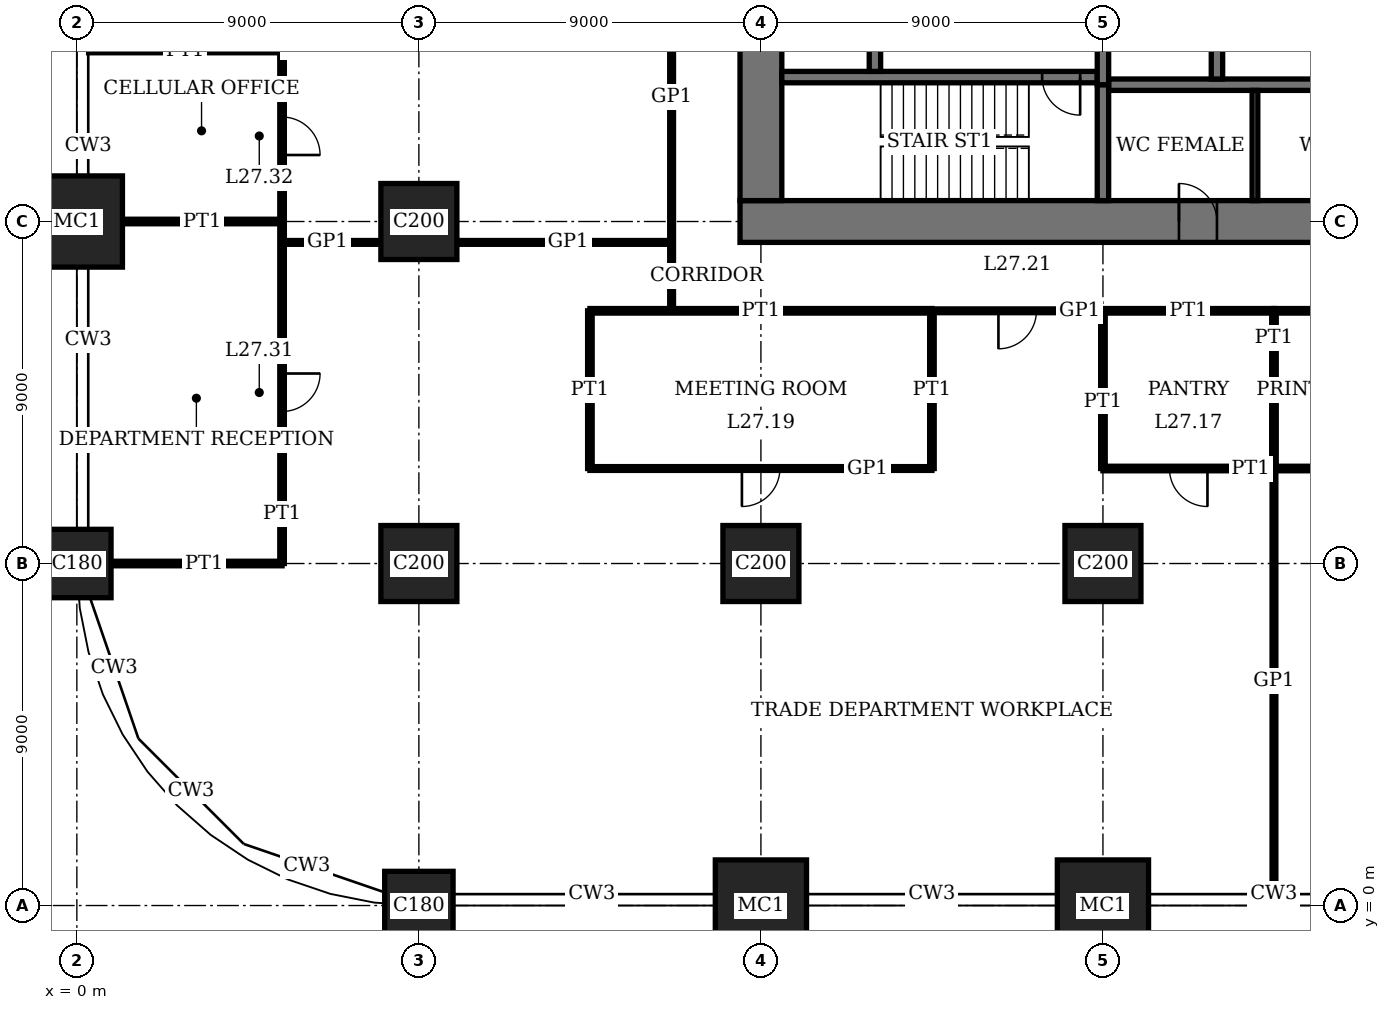
"""IFC4 building model, lengths in metres.
Left out: names, types, materials, properties, quantities, classifications, styles, units other than length and angle.
Written with IfcOpenShell. Run it as: python <this file> out.ifc"""

import sys

from ifc_helpers import new_model, si_unit, direction, frame, frame_2d, origin, origin_2d, place, context, subcontext, project, spatial, rectangle, extrude, element, fill, save


model = new_model("IFC4")
c1 = context("Model", 3, precision=1e-05, world=origin(), true_north=direction((0.0, 1.0)))
c2 = subcontext(c1, "Body", "Model", "MODEL_VIEW")
j1 = project(units=[si_unit("LENGTHUNIT", "METRE"), si_unit("PLANEANGLEUNIT", "RADIAN")], contexts=[c1])
p1 = place(None, origin())
s1 = spatial("IfcSite", under=j1, at=p1, CompositionType="ELEMENT")
p2 = place(p1, origin())
s2 = spatial("IfcBuilding", under=s1, at=p2, CompositionType="ELEMENT")
p3 = place(p2, frame((0.0, 0.0, 113.0)))
s3 = spatial("IfcBuildingStorey", under=s2, at=p3, CompositionType="ELEMENT", Elevation=113.0)
p4 = place(p3, frame((0.0, 9.0, 0.0), z_axis=(0.0, 0.0, 1.0), x_axis=(1.0, 0.0, 0.0)))
e1 = element("IfcColumn", 1, at=p4, inside=s3, PredefinedType="COLUMN", context=c2, shape_type="SweptSolid", body=[
    extrude(rectangle(XDim=1.8, YDim=1.8, at=origin_2d()), origin(), (0.0, 0.0, 1.0), 4.0),
])
p5 = place(p3, frame((0.0, 18.0, 0.0), z_axis=(0.0, 0.0, 1.0), x_axis=(1.0, 0.0, 0.0)))
e2 = element("IfcColumn", 2, at=p5, inside=s3, PredefinedType="COLUMN", context=c2, shape_type="SweptSolid", body=[
    extrude(rectangle(XDim=2.4, YDim=2.4, at=origin_2d()), origin(), (0.0, 0.0, 1.0), 4.0),
])
p6 = place(p3, frame((9.0, 0.0, 0.0), z_axis=(0.0, 0.0, 1.0), x_axis=(1.0, 0.0, 0.0)))
e3 = element("IfcColumn", 3, at=p6, inside=s3, PredefinedType="COLUMN", context=c2, shape_type="SweptSolid", body=[
    extrude(rectangle(XDim=1.8, YDim=1.8, at=origin_2d()), origin(), (0.0, 0.0, 1.0), 4.0),
])
for number, where, z_axis, x_axis in (
    (4, (9.0, 9.0, 0.0), (0.0, 0.0, 1.0), (1.0, 0.0, 0.0)),
    (5, (9.0, 18.0, 0.0), (0.0, 0.0, 1.0), (1.0, 0.0, 0.0)),
):
    element("IfcColumn", number, at=place(p3, frame(where, z_axis=z_axis, x_axis=x_axis)), inside=s3, PredefinedType="COLUMN", context=c2, shape_type="SweptSolid", body=[
        extrude(rectangle(XDim=2.0, YDim=2.0, at=origin_2d()), origin(), (0.0, 0.0, 1.0), 4.0),
    ])
p7 = place(p3, frame((18.0, 0.0, 0.0), z_axis=(0.0, 0.0, 1.0), x_axis=(1.0, 0.0, 0.0)))
e6 = element("IfcColumn", 6, at=p7, inside=s3, PredefinedType="COLUMN", context=c2, shape_type="SweptSolid", body=[
    extrude(rectangle(XDim=2.4, YDim=2.4, at=origin_2d()), origin(), (0.0, 0.0, 1.0), 4.0),
])
p8 = place(p3, frame((18.0, 9.0, 0.0), z_axis=(0.0, 0.0, 1.0), x_axis=(1.0, 0.0, 0.0)))
e7 = element("IfcColumn", 7, at=p8, inside=s3, PredefinedType="COLUMN", context=c2, shape_type="SweptSolid", body=[
    extrude(rectangle(XDim=2.0, YDim=2.0, at=origin_2d()), origin(), (0.0, 0.0, 1.0), 4.0),
])
p9 = place(p3, frame((27.0, 0.0, 0.0), z_axis=(0.0, 0.0, 1.0), x_axis=(1.0, 0.0, 0.0)))
e8 = element("IfcColumn", 8, at=p9, inside=s3, PredefinedType="COLUMN", context=c2, shape_type="SweptSolid", body=[
    extrude(rectangle(XDim=2.4, YDim=2.4, at=origin_2d()), origin(), (0.0, 0.0, 1.0), 4.0),
])
p10 = place(p3, frame((27.0, 9.0, 0.0), z_axis=(0.0, 0.0, 1.0), x_axis=(1.0, 0.0, 0.0)))
e9 = element("IfcColumn", 9, at=p10, inside=s3, PredefinedType="COLUMN", context=c2, shape_type="SweptSolid", body=[
    extrude(rectangle(XDim=2.0, YDim=2.0, at=origin_2d()), origin(), (0.0, 0.0, 1.0), 4.0),
])
p11 = place(p3, frame((17.45, 18.0, 0.0), z_axis=(0.0, 0.0, 1.0), x_axis=(1.0, 0.0, 0.0)))
e10 = element("IfcWall", 10, at=p11, inside=s3, PredefinedType="SHEAR", context=c2, shape_type="SweptSolid", body=[
    extrude(rectangle(XDim=28.1, YDim=1.1, at=frame_2d((14.05, 0.0))), origin(), (0.0, 0.0, 1.0), 4.0),
])
p12 = place(p11, frame((11.55, 0.0, 0.0)))
e11 = element("IfcOpeningElement", 11, at=p12, cuts=e10, PredefinedType="OPENING", context=c2, shape_type="SweptSolid", body=[
    extrude(rectangle(XDim=1.0, YDim=2.4, at=frame_2d((0.5, 1.2))), frame((0.0, 0.56, 0.0), z_axis=(0.0, -1.0, 0.0), x_axis=(1.0, 0.0, 0.0)), (0.0, 0.0, 1.0), 1.12),
])
p13 = place(p11, frame((16.55, 0.0, 0.0)))
e12 = element("IfcOpeningElement", 12, at=p13, cuts=e10, PredefinedType="OPENING", context=c2, shape_type="SweptSolid", body=[
    extrude(rectangle(XDim=1.0, YDim=2.4, at=frame_2d((0.5, 1.2))), frame((0.0, 0.56, 0.0), z_axis=(0.0, -1.0, 0.0), x_axis=(1.0, 0.0, 0.0)), (0.0, 0.0, 1.0), 1.12),
])
p14 = place(p11, frame((20.0, 0.0, 0.0)))
e13 = element("IfcOpeningElement", 13, at=p14, cuts=e10, PredefinedType="OPENING", context=c2, shape_type="SweptSolid", body=[
    extrude(rectangle(XDim=1.1, YDim=2.4, at=frame_2d((0.55, 1.2))), frame((0.0, 0.56, 0.0), z_axis=(0.0, -1.0, 0.0), x_axis=(1.0, 0.0, 0.0)), (0.0, 0.0, 1.0), 1.12),
])
p15 = place(p11, frame((24.05, 0.0, 0.0)))
e14 = element("IfcOpeningElement", 14, at=p15, cuts=e10, PredefinedType="OPENING", context=c2, shape_type="SweptSolid", body=[
    extrude(rectangle(XDim=1.0, YDim=2.4, at=frame_2d((0.5, 1.2))), frame((0.0, 0.56, 0.0), z_axis=(0.0, -1.0, 0.0), x_axis=(1.0, 0.0, 0.0)), (0.0, 0.0, 1.0), 1.12),
])
p16 = place(p3, frame((18.0, 35.45, 0.0), z_axis=(0.0, 0.0, 1.0), x_axis=(0.0, -1.0, 0.0)))
e15 = element("IfcWall", 15, at=p16, inside=s3, PredefinedType="SHEAR", context=c2, shape_type="SweptSolid", body=[
    extrude(rectangle(XDim=16.9, YDim=1.1, at=frame_2d((8.45, 0.0))), origin(), (0.0, 0.0, 1.0), 4.0),
])
p17 = place(p16, frame((8.45, 0.0, 0.0)))
e16 = element("IfcOpeningElement", 16, at=p17, cuts=e15, PredefinedType="OPENING", context=c2, shape_type="SweptSolid", body=[
    extrude(rectangle(XDim=1.8, YDim=2.4, at=frame_2d((0.9, 1.2))), frame((0.0, 0.56, 0.0), z_axis=(0.0, -1.0, 0.0), x_axis=(1.0, 0.0, 0.0)), (0.0, 0.0, 1.0), 1.12),
])
p18 = place(p3, frame((18.55, 21.8, 0.0), z_axis=(0.0, 0.0, 1.0), x_axis=(1.0, 0.0, 0.0)))
e17 = element("IfcWall", 17, at=p18, inside=s3, PredefinedType="SHEAR", context=c2, shape_type="SweptSolid", body=[
    extrude(rectangle(XDim=8.3, YDim=0.3, at=frame_2d((4.15, 0.0))), origin(), (0.0, 0.0, 1.0), 4.0),
])
p19 = place(p18, frame((6.85, 0.0, 0.0)))
e18 = element("IfcOpeningElement", 18, at=p19, cuts=e17, PredefinedType="OPENING", context=c2, shape_type="SweptSolid", body=[
    extrude(rectangle(XDim=1.0, YDim=2.4, at=frame_2d((0.5, 1.2))), frame((0.0, 0.16, 0.0), z_axis=(0.0, -1.0, 0.0), x_axis=(1.0, 0.0, 0.0)), (0.0, 0.0, 1.0), 0.32),
])
p20 = place(p3, frame((27.0, 18.55, 0.0), z_axis=(0.0, 0.0, 1.0), x_axis=(0.0, 1.0, 0.0)))
e19 = element("IfcWall", 19, at=p20, inside=s3, PredefinedType="SHEAR", context=c2, shape_type="SweptSolid", body=[
    extrude(rectangle(XDim=3.05, YDim=0.3, at=frame_2d((1.525, 0.0))), origin(), (0.0, 0.0, 1.0), 4.0),
])
p21 = place(p3, frame((21.0, 21.95, 0.0), z_axis=(0.0, 0.0, 1.0), x_axis=(0.0, 1.0, 0.0)))
e20 = element("IfcWall", 20, at=p21, inside=s3, PredefinedType="SHEAR", context=c2, shape_type="SweptSolid", body=[
    extrude(rectangle(XDim=2.5, YDim=0.3, at=frame_2d((1.25, 0.0))), origin(), (0.0, 0.0, 1.0), 4.0),
])
p22 = place(p21, frame((0.7, 0.0, 0.0)))
e21 = element("IfcOpeningElement", 21, at=p22, cuts=e20, PredefinedType="OPENING", context=c2, shape_type="SweptSolid", body=[
    extrude(rectangle(XDim=1.1, YDim=2.4, at=frame_2d((0.55, 1.2))), frame((0.0, 0.16, 0.0), z_axis=(0.0, -1.0, 0.0), x_axis=(1.0, 0.0, 0.0)), (0.0, 0.0, 1.0), 0.32),
])
p23 = place(p3, frame((27.15, 21.6, 0.0), z_axis=(0.0, 0.0, 1.0), x_axis=(1.0, 0.0, 0.0)))
e22 = element("IfcWall", 22, at=p23, inside=s3, PredefinedType="SHEAR", context=c2, shape_type="SweptSolid", body=[
    extrude(rectangle(XDim=17.3, YDim=0.3, at=frame_2d((8.65, 0.0))), origin(), (0.0, 0.0, 1.0), 4.0),
])
p24 = place(p3, frame((30.0, 21.75, 0.0), z_axis=(0.0, 0.0, 1.0), x_axis=(0.0, 1.0, 0.0)))
e23 = element("IfcWall", 23, at=p24, inside=s3, PredefinedType="SHEAR", context=c2, shape_type="SweptSolid", body=[
    extrude(rectangle(XDim=2.7, YDim=0.3, at=frame_2d((1.35, 0.0))), origin(), (0.0, 0.0, 1.0), 4.0),
])
p25 = place(p3, frame((27.0, 21.6, 0.0), z_axis=(0.0, 0.0, 1.0), x_axis=(0.0, 1.0, 0.0)))
e24 = element("IfcWall", 24, at=p25, inside=s3, PredefinedType="SHEAR", context=c2, shape_type="SweptSolid", body=[
    extrude(rectangle(XDim=2.85, YDim=0.3, at=frame_2d((1.425, 0.0))), origin(), (0.0, 0.0, 1.0), 4.0),
])
p26 = place(p3, frame((0.9, 9.0, 0.0), z_axis=(0.0, 0.0, 1.0), x_axis=(1.0, 0.0, 0.0)))
e25 = element("IfcWall", 25, at=p26, inside=s3, PredefinedType="PARTITIONING", context=c2, shape_type="SweptSolid", body=[
    extrude(rectangle(XDim=4.5, YDim=0.12, at=frame_2d((2.25, 0.0))), origin(), (0.0, 0.0, 1.0), 3.05),
])
p27 = place(p3, frame((27.0, 11.5, 0.0), z_axis=(0.0, 0.0, 1.0), x_axis=(1.0, 0.0, 0.0)))
e26 = element("IfcWall", 26, at=p27, inside=s3, PredefinedType="PARTITIONING", context=c2, shape_type="SweptSolid", body=[
    extrude(rectangle(XDim=4.5, YDim=0.12, at=frame_2d((2.25, 0.0))), origin(), (0.0, 0.0, 1.0), 3.75),
])
p28 = place(p27, frame((1.75, 0.0, 0.0)))
e27 = element("IfcOpeningElement", 27, at=p28, cuts=e26, PredefinedType="OPENING", context=c2, shape_type="SweptSolid", body=[
    extrude(rectangle(XDim=1.0, YDim=2.4, at=frame_2d((0.5, 1.2))), frame((0.0, 0.07, 0.0), z_axis=(0.0, -1.0, 0.0), x_axis=(1.0, 0.0, 0.0)), (0.0, 0.0, 1.0), 0.14),
])
p29 = place(p3, frame((31.5, 11.5, 0.0), z_axis=(0.0, 0.0, 1.0), x_axis=(1.0, 0.0, 0.0)))
e28 = element("IfcWall", 28, at=p29, inside=s3, PredefinedType="PARTITIONING", context=c2, shape_type="SweptSolid", body=[
    extrude(rectangle(XDim=4.5, YDim=0.12, at=frame_2d((2.25, 0.0))), origin(), (0.0, 0.0, 1.0), 3.75),
])
p30 = place(p29, frame((1.75, 0.0, 0.0)))
e29 = element("IfcOpeningElement", 29, at=p30, cuts=e28, PredefinedType="OPENING", context=c2, shape_type="SweptSolid", body=[
    extrude(rectangle(XDim=1.0, YDim=2.4, at=frame_2d((0.5, 1.2))), frame((0.0, 0.07, 0.0), z_axis=(0.0, -1.0, 0.0), x_axis=(1.0, 0.0, 0.0)), (0.0, 0.0, 1.0), 0.14),
])
p31 = place(p3, frame((13.5, 11.5, 0.0), z_axis=(0.0, 0.0, 1.0), x_axis=(1.0, 0.0, 0.0)))
e30 = element("IfcWall", 30, at=p31, inside=s3, PredefinedType="PARTITIONING", context=c2, shape_type="SweptSolid", body=[
    extrude(rectangle(XDim=9.0, YDim=0.1, at=frame_2d((4.5, 0.0))), origin(), (0.0, 0.0, 1.0), 3.75),
])
p32 = place(p31, frame((4.0, 0.0, 0.0)))
e31 = element("IfcOpeningElement", 31, at=p32, cuts=e30, PredefinedType="OPENING", context=c2, shape_type="SweptSolid", body=[
    extrude(rectangle(XDim=1.0, YDim=2.4, at=frame_2d((0.5, 1.2))), frame((0.0, 0.06, 0.0), z_axis=(0.0, -1.0, 0.0), x_axis=(1.0, 0.0, 0.0)), (0.0, 0.0, 1.0), 0.12),
])
p33 = place(p3, frame((13.5, 15.65, 0.0), z_axis=(0.0, 0.0, 1.0), x_axis=(1.0, 0.0, 0.0)))
e32 = element("IfcWall", 32, at=p33, inside=s3, PredefinedType="PARTITIONING", context=c2, shape_type="SweptSolid", body=[
    extrude(rectangle(XDim=9.0, YDim=0.12, at=frame_2d((4.5, 0.0))), origin(), (0.0, 0.0, 1.0), 3.75),
])
for number, where, z_axis, x_axis in (
    (33, (27.0, 15.65, 0.0), (0.0, 0.0, 1.0), (1.0, 0.0, 0.0)),
    (34, (31.5, 15.65, 0.0), (0.0, 0.0, 1.0), (1.0, 0.0, 0.0)),
):
    element("IfcWall", number, at=place(p3, frame(where, z_axis=z_axis, x_axis=x_axis)), inside=s3, PredefinedType="PARTITIONING", context=c2, shape_type="SweptSolid", body=[
        extrude(rectangle(XDim=4.5, YDim=0.12, at=frame_2d((2.25, 0.0))), origin(), (0.0, 0.0, 1.0), 3.75),
    ])
p34 = place(p3, frame((22.5, 15.65, 0.0), z_axis=(0.0, 0.0, 1.0), x_axis=(1.0, 0.0, 0.0)))
e35 = element("IfcWall", 35, at=p34, inside=s3, PredefinedType="PARTITIONING", context=c2, shape_type="SweptSolid", body=[
    extrude(rectangle(XDim=4.5, YDim=0.1, at=frame_2d((2.25, 0.0))), origin(), (0.0, 0.0, 1.0), 3.75),
])
p35 = place(p34, frame((1.75, 0.0, 0.0)))
e36 = element("IfcOpeningElement", 36, at=p35, cuts=e35, PredefinedType="OPENING", context=c2, shape_type="SweptSolid", body=[
    extrude(rectangle(XDim=1.0, YDim=2.4, at=frame_2d((0.5, 1.2))), frame((0.0, 0.06, 0.0), z_axis=(0.0, -1.0, 0.0), x_axis=(1.0, 0.0, 0.0)), (0.0, 0.0, 1.0), 0.12),
])
p36 = place(p3, frame((5.39, 17.45, 0.0), z_axis=(0.0, 0.0, 1.0), x_axis=(1.0, 0.0, 0.0)))
e37 = element("IfcWall", 37, at=p36, inside=s3, PredefinedType="PARTITIONING", context=c2, shape_type="SweptSolid", body=[
    extrude(rectangle(XDim=2.61, YDim=0.1, at=frame_2d((1.305, 0.0))), origin(), (0.0, 0.0, 1.0), 3.75),
])
p37 = place(p3, frame((10.0, 17.45, 0.0), z_axis=(0.0, 0.0, 1.0), x_axis=(1.0, 0.0, 0.0)))
e38 = element("IfcWall", 38, at=p37, inside=s3, PredefinedType="PARTITIONING", context=c2, shape_type="SweptSolid", body=[
    extrude(rectangle(XDim=5.65, YDim=0.1, at=frame_2d((2.825, 0.0))), origin(), (0.0, 0.0, 1.0), 3.75),
])
p38 = place(p3, frame((1.2, 18.0, 0.0), z_axis=(0.0, 0.0, 1.0), x_axis=(1.0, 0.0, 0.0)))
e39 = element("IfcWall", 39, at=p38, inside=s3, PredefinedType="PARTITIONING", context=c2, shape_type="SweptSolid", body=[
    extrude(rectangle(XDim=4.2, YDim=0.12, at=frame_2d((2.1, 0.0))), origin(), (0.0, 0.0, 1.0), 3.05),
])
p39 = place(p3, frame((0.31, 22.5, 0.0), z_axis=(0.0, 0.0, 1.0), x_axis=(1.0, 0.0, 0.0)))
e40 = element("IfcWall", 40, at=p39, inside=s3, PredefinedType="PARTITIONING", context=c2, shape_type="SweptSolid", body=[
    extrude(rectangle(XDim=5.09, YDim=0.12, at=frame_2d((2.545, 0.0))), origin(), (0.0, 0.0, 1.0), 3.1),
])
p40 = place(p3, frame((5.4, 9.0, 0.0), z_axis=(0.0, 0.0, 1.0), x_axis=(0.0, 1.0, 0.0)))
e41 = element("IfcWall", 41, at=p40, inside=s3, PredefinedType="PARTITIONING", context=c2, shape_type="SweptSolid", body=[
    extrude(rectangle(XDim=9.0, YDim=0.12, at=frame_2d((4.5, 0.0))), origin(), (0.0, 0.0, 1.0), 3.75),
])
p41 = place(p40, frame((4.0, 0.0, 0.0)))
e42 = element("IfcOpeningElement", 42, at=p41, cuts=e41, PredefinedType="OPENING", context=c2, shape_type="SweptSolid", body=[
    extrude(rectangle(XDim=1.0, YDim=2.4, at=frame_2d((0.5, 1.2))), frame((0.0, 0.07, 0.0), z_axis=(0.0, -1.0, 0.0), x_axis=(1.0, 0.0, 0.0)), (0.0, 0.0, 1.0), 0.14),
])
p42 = place(p3, frame((5.4, 18.0, 0.0), z_axis=(0.0, 0.0, 1.0), x_axis=(0.0, 1.0, 0.0)))
e43 = element("IfcWall", 43, at=p42, inside=s3, PredefinedType="PARTITIONING", context=c2, shape_type="SweptSolid", body=[
    extrude(rectangle(XDim=4.5, YDim=0.12, at=frame_2d((2.25, 0.0))), origin(), (0.0, 0.0, 1.0), 3.75),
])
p43 = place(p42, frame((1.75, 0.0, 0.0)))
e44 = element("IfcOpeningElement", 44, at=p43, cuts=e43, PredefinedType="OPENING", context=c2, shape_type="SweptSolid", body=[
    extrude(rectangle(XDim=1.0, YDim=2.4, at=frame_2d((0.5, 1.2))), frame((0.0, 0.07, 0.0), z_axis=(0.0, -1.0, 0.0), x_axis=(1.0, 0.0, 0.0)), (0.0, 0.0, 1.0), 0.14),
])
p44 = place(p3, frame((13.5, 11.5, 0.0), z_axis=(0.0, 0.0, 1.0), x_axis=(0.0, 1.0, 0.0)))
e45 = element("IfcWall", 45, at=p44, inside=s3, PredefinedType="PARTITIONING", context=c2, shape_type="SweptSolid", body=[
    extrude(rectangle(XDim=4.15, YDim=0.12, at=frame_2d((2.075, 0.0))), origin(), (0.0, 0.0, 1.0), 3.75),
])
p45 = place(p3, frame((15.65, 15.65, 0.0), z_axis=(0.0, 0.0, 1.0), x_axis=(0.0, 1.0, 0.0)))
e46 = element("IfcWall", 46, at=p45, inside=s3, PredefinedType="PARTITIONING", context=c2, shape_type="SweptSolid", body=[
    extrude(rectangle(XDim=20.9, YDim=0.1, at=frame_2d((10.45, 0.0))), origin(), (0.0, 0.0, 1.0), 3.75),
])
p46 = place(p45, frame((9.95, 0.0, 0.0)))
e47 = element("IfcOpeningElement", 47, at=p46, cuts=e46, PredefinedType="OPENING", context=c2, shape_type="SweptSolid", body=[
    extrude(rectangle(XDim=1.0, YDim=2.4, at=frame_2d((0.5, 1.2))), frame((0.0, 0.06, 0.0), z_axis=(0.0, -1.0, 0.0), x_axis=(1.0, 0.0, 0.0)), (0.0, 0.0, 1.0), 0.12),
])
p47 = place(p3, frame((22.5, 11.5, 0.0), z_axis=(0.0, 0.0, 1.0), x_axis=(0.0, 1.0, 0.0)))
e48 = element("IfcWall", 48, at=p47, inside=s3, PredefinedType="PARTITIONING", context=c2, shape_type="SweptSolid", body=[
    extrude(rectangle(XDim=4.15, YDim=0.12, at=frame_2d((2.075, 0.0))), origin(), (0.0, 0.0, 1.0), 3.75),
])
p48 = place(p3, frame((27.0, 11.5, 0.0), z_axis=(0.0, 0.0, 1.0), x_axis=(0.0, 1.0, 0.0)))
e49 = element("IfcWall", 49, at=p48, inside=s3, PredefinedType="PARTITIONING", context=c2, shape_type="SweptSolid", body=[
    extrude(rectangle(XDim=4.15, YDim=0.12, at=frame_2d((2.075, 0.0))), origin(), (0.0, 0.0, 1.0), 3.05),
])
p49 = place(p3, frame((31.5, 11.5, 0.0), z_axis=(0.0, 0.0, 1.0), x_axis=(0.0, 1.0, 0.0)))
e50 = element("IfcWall", 50, at=p49, inside=s3, PredefinedType="PARTITIONING", context=c2, shape_type="SweptSolid", body=[
    extrude(rectangle(XDim=4.15, YDim=0.12, at=frame_2d((2.075, 0.0))), origin(), (0.0, 0.0, 1.0), 3.75),
])
p50 = place(p3, frame((31.5, 0.31, 0.0), z_axis=(0.0, 0.0, 1.0), x_axis=(0.0, 1.0, 0.0)))
e51 = element("IfcWall", 51, at=p50, inside=s3, PredefinedType="PARTITIONING", context=c2, shape_type="SweptSolid", body=[
    extrude(rectangle(XDim=11.19, YDim=0.1, at=frame_2d((5.595, 0.0))), origin(), (0.0, 0.0, 1.0), 3.75),
])
p51 = place(p3, frame((31.0, 18.55, 0.0), z_axis=(0.0, 0.0, 1.0), x_axis=(0.0, 1.0, 0.0)))
e52 = element("IfcWall", 52, at=p51, inside=s3, PredefinedType="PARTITIONING", context=c2, shape_type="SweptSolid", body=[
    extrude(rectangle(XDim=2.9, YDim=0.15, at=frame_2d((1.45, 0.0))), origin(), (0.0, 0.0, 1.0), 3.75),
])
p52 = place(p12, origin())
e53 = element("IfcDoor", 53, at=p52, inside=s3, OperationType="SINGLE_SWING_RIGHT", PredefinedType="DOOR", context=c2, shape_type="SweptSolid", body=[
    extrude(rectangle(XDim=1.0, YDim=2.4, at=frame_2d((0.5, 1.2))), frame((0.0, 0.025, 0.0), z_axis=(0.0, -1.0, 0.0), x_axis=(1.0, 0.0, 0.0)), (0.0, 0.0, 1.0), 0.05),
    extrude(rectangle(XDim=0.04, YDim=2.4, at=frame_2d((0.02, 1.2))), frame((0.0, 0.4, 0.0), z_axis=(0.0, -1.0, 0.0), x_axis=(1.0, 0.0, 0.0)), (0.0, 0.0, 1.0), 0.8),
    extrude(rectangle(XDim=0.04, YDim=2.4, at=frame_2d((0.98, 1.2))), frame((0.0, 0.4, 0.0), z_axis=(0.0, -1.0, 0.0), x_axis=(1.0, 0.0, 0.0)), (0.0, 0.0, 1.0), 0.8),
    extrude(rectangle(XDim=1.0, YDim=0.04, at=frame_2d((0.5, 2.38))), frame((0.0, 0.4, 0.0), z_axis=(0.0, -1.0, 0.0), x_axis=(1.0, 0.0, 0.0)), (0.0, 0.0, 1.0), 0.8),
])
fill(e11, e53)
p53 = place(p19, origin())
e54 = element("IfcDoor", 54, at=p53, inside=s3, OperationType="SINGLE_SWING_RIGHT", PredefinedType="DOOR", context=c2, shape_type="SweptSolid", body=[
    extrude(rectangle(XDim=1.0, YDim=2.4, at=frame_2d((0.5, 1.2))), frame((0.0, 0.03, 0.0), z_axis=(0.0, -1.0, 0.0), x_axis=(1.0, 0.0, 0.0)), (0.0, 0.0, 1.0), 0.06),
])
fill(e18, e54)
p54 = place(p28, origin())
e55 = element("IfcDoor", 55, at=p54, inside=s3, OperationType="SINGLE_SWING_RIGHT", PredefinedType="DOOR", context=c2, shape_type="SweptSolid", body=[
    extrude(rectangle(XDim=1.0, YDim=2.4, at=frame_2d((0.5, 1.2))), frame((0.0, 0.025, 0.0), z_axis=(0.0, -1.0, 0.0), x_axis=(1.0, 0.0, 0.0)), (0.0, 0.0, 1.0), 0.05),
])
fill(e27, e55)
p55 = place(p32, origin())
e56 = element("IfcDoor", 56, at=p55, inside=s3, OperationType="SINGLE_SWING_LEFT", PredefinedType="DOOR", context=c2, shape_type="SweptSolid", body=[
    extrude(rectangle(XDim=1.0, YDim=2.4, at=frame_2d((0.5, 1.2))), frame((0.0, 0.02, 0.0), z_axis=(0.0, -1.0, 0.0), x_axis=(1.0, 0.0, 0.0)), (0.0, 0.0, 1.0), 0.04),
])
fill(e31, e56)
p56 = place(p35, origin())
e57 = element("IfcDoor", 57, at=p56, inside=s3, OperationType="SINGLE_SWING_LEFT", PredefinedType="DOOR", context=c2, shape_type="SweptSolid", body=[
    extrude(rectangle(XDim=1.0, YDim=2.4, at=frame_2d((0.5, 1.2))), frame((0.0, 0.02, 0.0), z_axis=(0.0, -1.0, 0.0), x_axis=(1.0, 0.0, 0.0)), (0.0, 0.0, 1.0), 0.04),
])
fill(e36, e57)
p57 = place(p41, origin())
e58 = element("IfcDoor", 58, at=p57, inside=s3, OperationType="SINGLE_SWING_RIGHT", PredefinedType="DOOR", context=c2, shape_type="SweptSolid", body=[
    extrude(rectangle(XDim=1.0, YDim=2.4, at=frame_2d((0.5, 1.2))), frame((0.0, 0.025, 0.0), z_axis=(0.0, -1.0, 0.0), x_axis=(1.0, 0.0, 0.0)), (0.0, 0.0, 1.0), 0.05),
])
fill(e42, e58)
p58 = place(p43, origin())
e59 = element("IfcDoor", 59, at=p58, inside=s3, OperationType="SINGLE_SWING_LEFT", PredefinedType="DOOR", context=c2, shape_type="SweptSolid", body=[
    extrude(rectangle(XDim=1.0, YDim=2.4, at=frame_2d((0.5, 1.2))), frame((0.0, 0.025, 0.0), z_axis=(0.0, -1.0, 0.0), x_axis=(1.0, 0.0, 0.0)), (0.0, 0.0, 1.0), 0.05),
])
fill(e44, e59)
save(model, sys.argv[1])
